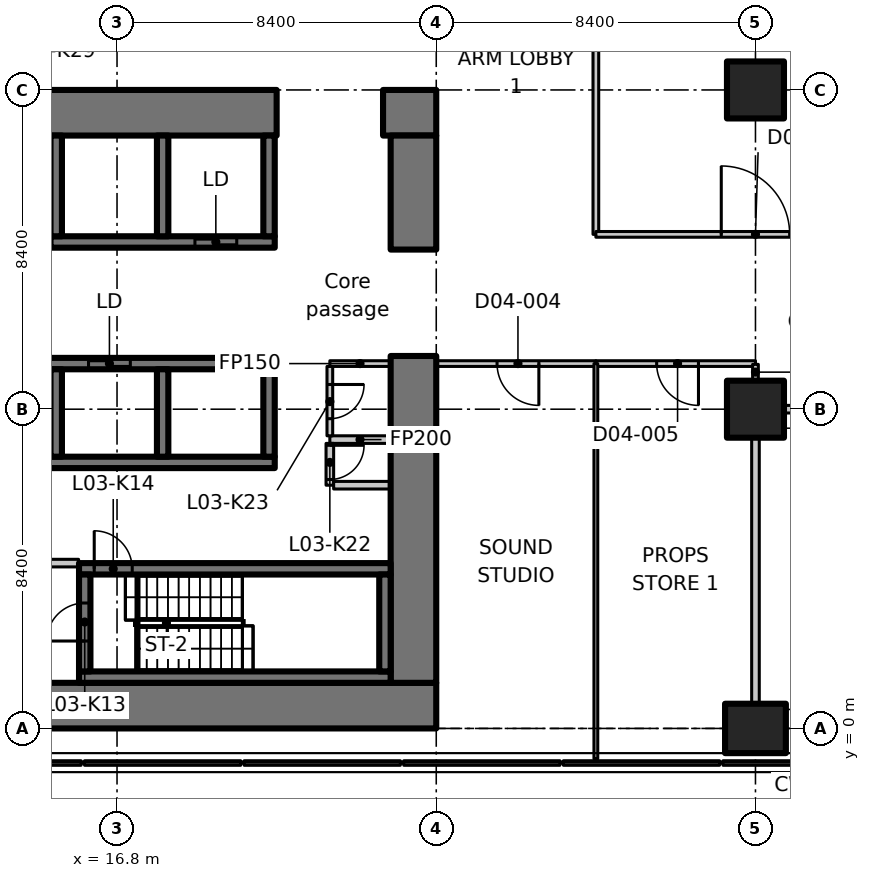
"""IFC4 building model, lengths in metres.
Left out: names, types, materials, properties, quantities, classifications, styles, units other than length and angle.
Written with IfcOpenShell. Run it as: python <this file> out.ifc"""

import sys

from ifc_helpers import new_model, si_unit, direction, frame, frame_2d, origin, origin_2d, place, context, subcontext, project, spatial, polyline, rectangle, outline, extrude, element, fill, save


model = new_model("IFC4")
c1 = context("Model", 3, precision=1e-05, world=origin(), true_north=direction((0.0, 1.0)))
c2 = subcontext(c1, "Body", "Model", "MODEL_VIEW")
j1 = project(units=[si_unit("LENGTHUNIT", "METRE"), si_unit("PLANEANGLEUNIT", "RADIAN")], contexts=[c1])
p1 = place(None, origin())
s1 = spatial("IfcSite", under=j1, at=p1, CompositionType="ELEMENT")
p2 = place(p1, origin())
s2 = spatial("IfcBuilding", under=s1, at=p2, CompositionType="ELEMENT")
p3 = place(p2, frame((0.0, 0.0, 20.0)))
s3 = spatial("IfcBuildingStorey", under=s2, at=p3, CompositionType="ELEMENT", Elevation=20.0)
p4 = place(p3, frame((33.6, 0.0, 0.0), z_axis=(0.0, 0.0, 1.0), x_axis=(0.0, 1.0, 0.0)))
e1 = element("IfcColumn", 1, at=p4, inside=s3, PredefinedType="COLUMN", context=c2, shape_type="SweptSolid", body=[
    extrude(rectangle(XDim=1.3, YDim=1.6, at=origin_2d()), origin(), (0.0, 0.0, 1.0), 7.25),
])
for number, where, z_axis, x_axis in (
    (2, (33.6, 8.4, 0.0), (0.0, 0.0, 1.0), (1.0, 0.0, 0.0)),
    (3, (33.6, 16.8, 0.0), (0.0, 0.0, 1.0), (1.0, 0.0, 0.0)),
):
    element("IfcColumn", number, at=place(p3, frame(where, z_axis=z_axis, x_axis=x_axis)), inside=s3, PredefinedType="COLUMN", context=c2, shape_type="SweptSolid", body=[
        extrude(rectangle(XDim=1.5, YDim=1.5, at=origin_2d()), origin(), (0.0, 0.0, 1.0), 7.25),
    ])
p5 = place(p3, origin())
e4 = element("IfcWall", 4, at=p5, inside=s3, PredefinedType="SOLIDWALL", context=c2, shape_type="SweptSolid", body=[
    extrude(outline(polyline([(15.855, -0.97), (15.855, -0.85), (11.745, -0.85), (11.745, -0.97), (15.855, -0.97)])), origin(), (0.0, 0.0, 1.0), 7.5),
])
p6 = place(p3, origin())
e5 = element("IfcWall", 5, at=p6, inside=s3, PredefinedType="SOLIDWALL", context=c2, shape_type="SweptSolid", body=[
    extrude(outline(polyline([(20.055, -0.97), (20.055, -0.85), (15.945, -0.85), (15.945, -0.97), (20.055, -0.97)])), origin(), (0.0, 0.0, 1.0), 7.5),
])
p7 = place(p3, origin())
e6 = element("IfcWall", 6, at=p7, inside=s3, PredefinedType="SOLIDWALL", context=c2, shape_type="SweptSolid", body=[
    extrude(outline(polyline([(24.255, -0.97), (24.255, -0.85), (20.145, -0.85), (20.145, -0.97), (24.255, -0.97)])), origin(), (0.0, 0.0, 1.0), 7.5),
])
p8 = place(p3, origin())
e7 = element("IfcWall", 7, at=p8, inside=s3, PredefinedType="SOLIDWALL", context=c2, shape_type="SweptSolid", body=[
    extrude(outline(polyline([(28.455, -0.97), (28.455, -0.85), (24.345, -0.85), (24.345, -0.97), (28.455, -0.97)])), origin(), (0.0, 0.0, 1.0), 7.5),
])
p9 = place(p3, origin())
e8 = element("IfcWall", 8, at=p9, inside=s3, PredefinedType="SOLIDWALL", context=c2, shape_type="SweptSolid", body=[
    extrude(outline(polyline([(32.655, -0.97), (32.655, -0.85), (28.545, -0.85), (28.545, -0.97), (32.655, -0.97)])), origin(), (0.0, 0.0, 1.0), 7.5),
])
p10 = place(p3, origin())
e9 = element("IfcWall", 9, at=p10, inside=s3, PredefinedType="SOLIDWALL", context=c2, shape_type="SweptSolid", body=[
    extrude(outline(polyline([(36.855, -0.97), (36.855, -0.85), (32.745, -0.85), (32.745, -0.97), (36.855, -0.97)])), origin(), (0.0, 0.0, 1.0), 7.5),
])
p11 = place(p3, frame((6.736, 0.6, 0.0), z_axis=(0.0, 0.0, 1.0), x_axis=(1.0, 0.0, 0.0)))
e10 = element("IfcWall", 10, at=p11, inside=s3, PredefinedType="SHEAR", context=c2, shape_type="SweptSolid", body=[
    extrude(rectangle(XDim=18.464, YDim=1.2, at=frame_2d((9.232, 0.0))), origin(), (0.0, 0.0, 1.0), 7.25),
])
p12 = place(p3, frame((-1.1, 16.2, 0.0), z_axis=(0.0, 0.0, 1.0), x_axis=(1.0, 0.0, 0.0)))
e11 = element("IfcWall", 11, at=p12, inside=s3, PredefinedType="SHEAR", context=c2, shape_type="SweptSolid", body=[
    extrude(rectangle(XDim=22.1, YDim=1.2, at=frame_2d((11.05, 0.0))), origin(), (0.0, 0.0, 1.0), 7.25),
])
p13 = place(p12, frame((3.15, 0.0, 0.0)))
e12 = element("IfcOpeningElement", 12, at=p13, cuts=e11, PredefinedType="OPENING", context=c2, shape_type="SweptSolid", body=[
    extrude(rectangle(XDim=1.1, YDim=2.3, at=frame_2d((0.55, 1.15))), frame((0.0, 0.61, 0.0), z_axis=(0.0, -1.0, 0.0), x_axis=(1.0, 0.0, 0.0)), (0.0, 0.0, 1.0), 1.22),
])
p14 = place(p3, frame((23.8, 16.2, 0.0), z_axis=(0.0, 0.0, 1.0), x_axis=(1.0, 0.0, 0.0)))
e13 = element("IfcWall", 13, at=p14, inside=s3, PredefinedType="SHEAR", context=c2, shape_type="SweptSolid", body=[
    extrude(rectangle(XDim=1.4, YDim=1.2, at=frame_2d((0.7, 0.0))), origin(), (0.0, 0.0, 1.0), 7.25),
])
p15 = place(p3, frame((24.6, 1.2, 0.0), z_axis=(0.0, 0.0, 1.0), x_axis=(0.0, 1.0, 0.0)))
e14 = element("IfcWall", 14, at=p15, inside=s3, PredefinedType="SHEAR", context=c2, shape_type="SweptSolid", body=[
    extrude(rectangle(XDim=8.6, YDim=1.2, at=frame_2d((4.3, 0.0))), origin(), (0.0, 0.0, 1.0), 7.25),
])
p16 = place(p3, frame((24.6, 12.6, 0.0), z_axis=(0.0, 0.0, 1.0), x_axis=(0.0, 1.0, 0.0)))
e15 = element("IfcWall", 15, at=p16, inside=s3, PredefinedType="SHEAR", context=c2, shape_type="SweptSolid", body=[
    extrude(rectangle(XDim=3.0, YDim=1.2, at=frame_2d((1.5, 0.0))), origin(), (0.0, 0.0, 1.0), 7.25),
])
p17 = place(p3, frame((1.2, 7.0, 0.0), z_axis=(0.0, 0.0, 1.0), x_axis=(1.0, 0.0, 0.0)))
e16 = element("IfcWall", 16, at=p17, inside=s3, PredefinedType="SHEAR", context=c2, shape_type="SweptSolid", body=[
    extrude(rectangle(XDim=19.75, YDim=0.3, at=frame_2d((9.875, 0.0))), origin(), (0.0, 0.0, 1.0), 7.25),
])
p18 = place(p3, frame((1.2, 9.6, 0.0), z_axis=(0.0, 0.0, 1.0), x_axis=(1.0, 0.0, 0.0)))
e17 = element("IfcWall", 17, at=p18, inside=s3, PredefinedType="SHEAR", context=c2, shape_type="SweptSolid", body=[
    extrude(rectangle(XDim=19.75, YDim=0.3, at=frame_2d((9.875, 0.0))), origin(), (0.0, 0.0, 1.0), 7.25),
])
p19 = place(p18, frame((0.85, 0.0, 0.0)))
e18 = element("IfcOpeningElement", 18, at=p19, cuts=e17, PredefinedType="OPENING", context=c2, shape_type="SweptSolid", body=[
    extrude(rectangle(XDim=1.1, YDim=2.3, at=frame_2d((0.55, 1.15))), frame((0.0, 0.16, 0.0), z_axis=(0.0, -1.0, 0.0), x_axis=(1.0, 0.0, 0.0)), (0.0, 0.0, 1.0), 0.32),
])
p20 = place(p18, frame((3.65, 0.0, 0.0)))
e19 = element("IfcOpeningElement", 19, at=p20, cuts=e17, PredefinedType="OPENING", context=c2, shape_type="SweptSolid", body=[
    extrude(rectangle(XDim=1.1, YDim=2.3, at=frame_2d((0.55, 1.15))), frame((0.0, 0.16, 0.0), z_axis=(0.0, -1.0, 0.0), x_axis=(1.0, 0.0, 0.0)), (0.0, 0.0, 1.0), 0.32),
])
p21 = place(p18, frame((6.45, 0.0, 0.0)))
e20 = element("IfcOpeningElement", 20, at=p21, cuts=e17, PredefinedType="OPENING", context=c2, shape_type="SweptSolid", body=[
    extrude(rectangle(XDim=1.1, YDim=2.3, at=frame_2d((0.55, 1.15))), frame((0.0, 0.16, 0.0), z_axis=(0.0, -1.0, 0.0), x_axis=(1.0, 0.0, 0.0)), (0.0, 0.0, 1.0), 0.32),
])
p22 = place(p18, frame((9.25, 0.0, 0.0)))
e21 = element("IfcOpeningElement", 21, at=p22, cuts=e17, PredefinedType="OPENING", context=c2, shape_type="SweptSolid", body=[
    extrude(rectangle(XDim=1.1, YDim=2.3, at=frame_2d((0.55, 1.15))), frame((0.0, 0.16, 0.0), z_axis=(0.0, -1.0, 0.0), x_axis=(1.0, 0.0, 0.0)), (0.0, 0.0, 1.0), 0.32),
])
p23 = place(p18, frame((12.05, 0.0, 0.0)))
e22 = element("IfcOpeningElement", 22, at=p23, cuts=e17, PredefinedType="OPENING", context=c2, shape_type="SweptSolid", body=[
    extrude(rectangle(XDim=1.1, YDim=2.3, at=frame_2d((0.55, 1.15))), frame((0.0, 0.16, 0.0), z_axis=(0.0, -1.0, 0.0), x_axis=(1.0, 0.0, 0.0)), (0.0, 0.0, 1.0), 0.32),
])
p24 = place(p18, frame((14.85, 0.0, 0.0)))
e23 = element("IfcOpeningElement", 23, at=p24, cuts=e17, PredefinedType="OPENING", context=c2, shape_type="SweptSolid", body=[
    extrude(rectangle(XDim=1.1, YDim=2.3, at=frame_2d((0.55, 1.15))), frame((0.0, 0.16, 0.0), z_axis=(0.0, -1.0, 0.0), x_axis=(1.0, 0.0, 0.0)), (0.0, 0.0, 1.0), 0.32),
])
for number, where, z_axis, x_axis in (
    (24, (15.2, 7.15, 0.0), (0.0, 0.0, 1.0), (0.0, 1.0, 0.0)),
    (25, (18.0, 7.15, 0.0), (0.0, 0.0, 1.0), (0.0, 1.0, 0.0)),
    (26, (20.8, 7.15, 0.0), (0.0, 0.0, 1.0), (0.0, 1.0, 0.0)),
):
    element("IfcWall", number, at=place(p3, frame(where, z_axis=z_axis, x_axis=x_axis)), inside=s3, PredefinedType="SHEAR", context=c2, shape_type="SweptSolid", body=[
        extrude(rectangle(XDim=2.3, YDim=0.3, at=frame_2d((1.15, 0.0))), origin(), (0.0, 0.0, 1.0), 7.25),
    ])
p25 = place(p3, frame((15.05, 12.8, 0.0), z_axis=(0.0, 0.0, 1.0), x_axis=(1.0, 0.0, 0.0)))
e27 = element("IfcWall", 27, at=p25, inside=s3, PredefinedType="SHEAR", context=c2, shape_type="SweptSolid", body=[
    extrude(rectangle(XDim=5.9, YDim=0.3, at=frame_2d((2.95, 0.0))), origin(), (0.0, 0.0, 1.0), 7.25),
])
p26 = place(p25, frame((3.8, 0.0, 0.0)))
e28 = element("IfcOpeningElement", 28, at=p26, cuts=e27, PredefinedType="OPENING", context=c2, shape_type="SweptSolid", body=[
    extrude(rectangle(XDim=1.1, YDim=2.3, at=frame_2d((0.55, 1.15))), frame((0.0, 0.16, 0.0), z_axis=(0.0, -1.0, 0.0), x_axis=(1.0, 0.0, 0.0)), (0.0, 0.0, 1.0), 0.32),
])
for number, where, z_axis, x_axis in (
    (29, (15.2, 12.95, 0.0), (0.0, 0.0, 1.0), (0.0, 1.0, 0.0)),
    (30, (18.0, 12.95, 0.0), (0.0, 0.0, 1.0), (0.0, 1.0, 0.0)),
    (31, (20.8, 12.95, 0.0), (0.0, 0.0, 1.0), (0.0, 1.0, 0.0)),
):
    element("IfcWall", number, at=place(p3, frame(where, z_axis=z_axis, x_axis=x_axis)), inside=s3, PredefinedType="SHEAR", context=c2, shape_type="SweptSolid", body=[
        extrude(rectangle(XDim=2.65, YDim=0.3, at=frame_2d((1.325, 0.0))), origin(), (0.0, 0.0, 1.0), 7.25),
    ])
p27 = place(p3, frame((15.8, 1.35, 0.0), z_axis=(0.0, 0.0, 1.0), x_axis=(1.0, 0.0, 0.0)))
e32 = element("IfcWall", 32, at=p27, inside=s3, PredefinedType="SHEAR", context=c2, shape_type="SweptSolid", body=[
    extrude(rectangle(XDim=8.2, YDim=0.3, at=frame_2d((4.1, 0.0))), origin(), (0.0, 0.0, 1.0), 7.25),
])
p28 = place(p3, frame((15.8, 4.2, 0.0), z_axis=(0.0, 0.0, 1.0), x_axis=(1.0, 0.0, 0.0)))
e33 = element("IfcWall", 33, at=p28, inside=s3, PredefinedType="SHEAR", context=c2, shape_type="SweptSolid", body=[
    extrude(rectangle(XDim=8.2, YDim=0.3, at=frame_2d((4.1, 0.0))), origin(), (0.0, 0.0, 1.0), 7.25),
])
p29 = place(p28, frame((0.4, 0.0, 0.0)))
e34 = element("IfcOpeningElement", 34, at=p29, cuts=e33, PredefinedType="OPENING", context=c2, shape_type="SweptSolid", body=[
    extrude(rectangle(XDim=1.0, YDim=2.1, at=frame_2d((0.5, 1.05))), frame((0.0, 0.16, 0.0), z_axis=(0.0, -1.0, 0.0), x_axis=(1.0, 0.0, 0.0)), (0.0, 0.0, 1.0), 0.32),
])
p30 = place(p3, frame((15.95, 1.5, 0.0), z_axis=(0.0, 0.0, 1.0), x_axis=(0.0, 1.0, 0.0)))
e35 = element("IfcWall", 35, at=p30, inside=s3, PredefinedType="SHEAR", context=c2, shape_type="SweptSolid", body=[
    extrude(rectangle(XDim=2.55, YDim=0.3, at=frame_2d((1.275, 0.0))), origin(), (0.0, 0.0, 1.0), 7.25),
])
p31 = place(p30, frame((0.8, 0.0, 0.0)))
e36 = element("IfcOpeningElement", 36, at=p31, cuts=e35, PredefinedType="OPENING", context=c2, shape_type="SweptSolid", body=[
    extrude(rectangle(XDim=1.0, YDim=2.1, at=frame_2d((0.5, 1.05))), frame((0.0, 0.16, 0.0), z_axis=(0.0, -1.0, 0.0), x_axis=(1.0, 0.0, 0.0)), (0.0, 0.0, 1.0), 0.32),
])
p32 = place(p3, frame((23.85, 1.5, 0.0), z_axis=(0.0, 0.0, 1.0), x_axis=(0.0, 1.0, 0.0)))
e37 = element("IfcWall", 37, at=p32, inside=s3, PredefinedType="SHEAR", context=c2, shape_type="SweptSolid", body=[
    extrude(rectangle(XDim=2.55, YDim=0.3, at=frame_2d((1.275, 0.0))), origin(), (0.0, 0.0, 1.0), 7.25),
])
p33 = place(p3, frame((13.362, 4.35, 0.0), z_axis=(0.0, 0.0, 1.0), x_axis=(1.0, 0.0, 0.0)))
e38 = element("IfcWall", 38, at=p33, inside=s3, PredefinedType="PARTITIONING", context=c2, shape_type="SweptSolid", body=[
    extrude(rectangle(XDim=2.426, YDim=0.2, at=frame_2d((1.213, 0.0))), origin(), (0.0, 0.0, 1.0), 7.25),
])
p34 = place(p33, frame((0.638, 0.0, 0.0)))
e39 = element("IfcOpeningElement", 39, at=p34, cuts=e38, PredefinedType="OPENING", context=c2, shape_type="SweptSolid", body=[
    extrude(rectangle(XDim=1.0, YDim=2.1, at=frame_2d((0.5, 1.05))), frame((0.0, 0.11, 0.0), z_axis=(0.0, -1.0, 0.0), x_axis=(1.0, 0.0, 0.0)), (0.0, 0.0, 1.0), 0.22),
])
p35 = place(p3, frame((23.988, 7.6, 0.0), z_axis=(0.0, 0.0, 1.0), x_axis=(-1.0, 0.0, 0.0)))
e40 = element("IfcWall", 40, at=p35, inside=s3, PredefinedType="PARTITIONING", context=c2, shape_type="SweptSolid", body=[
    extrude(rectangle(XDim=1.588, YDim=0.2, at=frame_2d((0.794, 0.0))), origin(), (0.0, 0.0, 1.0), 7.25),
])
p36 = place(p3, frame((22.4, 7.5, 0.0), z_axis=(0.0, 0.0, 1.0), x_axis=(0.0, -1.0, 0.0)))
e41 = element("IfcWall", 41, at=p36, inside=s3, PredefinedType="PARTITIONING", context=c2, shape_type="SweptSolid", body=[
    extrude(rectangle(XDim=1.1, YDim=0.2, at=frame_2d((0.55, 0.0))), origin(), (0.0, 0.0, 1.0), 7.25),
])
p37 = place(p36, frame((0.05, 0.0, 0.0)))
e42 = element("IfcOpeningElement", 42, at=p37, cuts=e41, PredefinedType="OPENING", context=c2, shape_type="SweptSolid", body=[
    extrude(rectangle(XDim=0.9, YDim=2.1, at=frame_2d((0.45, 1.05))), frame((0.0, 0.11, 0.0), z_axis=(0.0, -1.0, 0.0), x_axis=(1.0, 0.0, 0.0)), (0.0, 0.0, 1.0), 0.22),
])
p38 = place(p3, frame((22.5, 6.4, 0.0), z_axis=(0.0, 0.0, 1.0), x_axis=(1.0, 0.0, 0.0)))
e43 = element("IfcWall", 43, at=p38, inside=s3, PredefinedType="PARTITIONING", context=c2, shape_type="SweptSolid", body=[
    extrude(rectangle(XDim=1.488, YDim=0.2, at=frame_2d((0.744, 0.0))), origin(), (0.0, 0.0, 1.0), 7.25),
])
p39 = place(p3, frame((23.988, 9.6, 0.0), z_axis=(0.0, 0.0, 1.0), x_axis=(-1.0, 0.0, 0.0)))
e44 = element("IfcWall", 44, at=p39, inside=s3, PredefinedType="PARTITIONING", context=c2, shape_type="SweptSolid", body=[
    extrude(rectangle(XDim=1.588, YDim=0.15, at=frame_2d((0.794, 0.0))), origin(), (0.0, 0.0, 1.0), 7.25),
])
p40 = place(p3, frame((22.4, 9.525, 0.0), z_axis=(0.0, 0.0, 1.0), x_axis=(0.0, -1.0, 0.0)))
e45 = element("IfcWall", 45, at=p40, inside=s3, PredefinedType="PARTITIONING", context=c2, shape_type="SweptSolid", body=[
    extrude(rectangle(XDim=1.825, YDim=0.15, at=frame_2d((0.913, 0.0))), origin(), (0.0, 0.0, 1.0), 7.25),
])
p41 = place(p40, frame((0.475, 0.0, 0.0)))
e46 = element("IfcOpeningElement", 46, at=p41, cuts=e45, PredefinedType="OPENING", context=c2, shape_type="SweptSolid", body=[
    extrude(rectangle(XDim=0.9, YDim=2.1, at=frame_2d((0.45, 1.05))), frame((0.0, 0.085, 0.0), z_axis=(0.0, -1.0, 0.0), x_axis=(1.0, 0.0, 0.0)), (0.0, 0.0, 1.0), 0.17),
])
p42 = place(p3, frame((29.4, 9.6, 0.0), z_axis=(0.0, 0.0, 1.0), x_axis=(-1.0, 0.0, 0.0)))
e47 = element("IfcWall", 47, at=p42, inside=s3, PredefinedType="PARTITIONING", context=c2, shape_type="SweptSolid", body=[
    extrude(rectangle(XDim=4.2, YDim=0.15, at=frame_2d((2.1, 0.0))), origin(), (0.0, 0.0, 1.0), 7.23),
])
p43 = place(p42, frame((1.5, 0.0, 0.0)))
e48 = element("IfcOpeningElement", 48, at=p43, cuts=e47, PredefinedType="OPENING", context=c2, shape_type="SweptSolid", body=[
    extrude(rectangle(XDim=1.1, YDim=2.1, at=frame_2d((0.55, 1.05))), frame((0.0, 0.085, 0.0), z_axis=(0.0, -1.0, 0.0), x_axis=(1.0, 0.0, 0.0)), (0.0, 0.0, 1.0), 0.17),
])
p44 = place(p3, frame((29.4, 21.2, 0.0), z_axis=(0.0, 0.0, 1.0), x_axis=(0.0, -1.0, 0.0)))
e49 = element("IfcWall", 49, at=p44, inside=s3, PredefinedType="PARTITIONING", context=c2, shape_type="SweptSolid", body=[
    extrude(rectangle(XDim=8.2, YDim=0.15, at=frame_2d((4.1, 0.0))), origin(), (0.0, 0.0, 1.0), 7.23),
])
p45 = place(p3, frame((41.23, 8.4, 0.0), z_axis=(0.0, 0.0, 1.0), x_axis=(-1.0, 0.0, 0.0)))
e50 = element("IfcWall", 50, at=p45, inside=s3, PredefinedType="PARTITIONING", context=c2, shape_type="SweptSolid", body=[
    extrude(rectangle(XDim=6.86, YDim=0.2, at=frame_2d((3.43, 0.0))), origin(), (0.0, 0.0, 1.0), 7.23),
])
p46 = place(p3, frame((33.6, 9.6, 0.0), z_axis=(0.0, 0.0, 1.0), x_axis=(-1.0, 0.0, 0.0)))
e51 = element("IfcWall", 51, at=p46, inside=s3, PredefinedType="PARTITIONING", context=c2, shape_type="SweptSolid", body=[
    extrude(rectangle(XDim=4.2, YDim=0.15, at=frame_2d((2.1, 0.0))), origin(), (0.0, 0.0, 1.0), 7.23),
])
p47 = place(p46, frame((1.5, 0.0, 0.0)))
e52 = element("IfcOpeningElement", 52, at=p47, cuts=e51, PredefinedType="OPENING", context=c2, shape_type="SweptSolid", body=[
    extrude(rectangle(XDim=1.1, YDim=2.1, at=frame_2d((0.55, 1.05))), frame((0.0, 0.085, 0.0), z_axis=(0.0, -1.0, 0.0), x_axis=(1.0, 0.0, 0.0)), (0.0, 0.0, 1.0), 0.17),
])
p48 = place(p3, frame((33.6, 9.17, 0.0), z_axis=(0.0, 0.0, 1.0), x_axis=(0.0, 1.0, 0.0)))
e53 = element("IfcWall", 53, at=p48, inside=s3, PredefinedType="PARTITIONING", context=c2, shape_type="SweptSolid", body=[
    extrude(rectangle(XDim=0.41, YDim=0.15, at=frame_2d((0.205, 0.0))), origin(), (0.0, 0.0, 1.0), 7.23),
])
p49 = place(p3, frame((29.4, 13.0, 0.0), z_axis=(0.0, 0.0, 1.0), x_axis=(1.0, 0.0, 0.0)))
e54 = element("IfcWall", 54, at=p49, inside=s3, PredefinedType="PARTITIONING", context=c2, shape_type="SweptSolid", body=[
    extrude(rectangle(XDim=8.4, YDim=0.15, at=frame_2d((4.2, 0.0))), origin(), (0.0, 0.0, 1.0), 7.23),
])
p50 = place(p49, frame((3.3, 0.0, 0.0)))
e55 = element("IfcOpeningElement", 55, at=p50, cuts=e54, PredefinedType="OPENING", context=c2, shape_type="SweptSolid", body=[
    extrude(rectangle(XDim=1.8, YDim=2.1, at=frame_2d((0.9, 1.05))), frame((0.0, 0.085, 0.0), z_axis=(0.0, -1.0, 0.0), x_axis=(1.0, 0.0, 0.0)), (0.0, 0.0, 1.0), 0.17),
])
p51 = place(p3, frame((33.6, 0.67, 0.0), z_axis=(0.0, 0.0, 1.0), x_axis=(0.0, 1.0, 0.0)))
e56 = element("IfcWall", 56, at=p51, inside=s3, PredefinedType="PARTITIONING", context=c2, shape_type="SweptSolid", body=[
    extrude(rectangle(XDim=6.96, YDim=0.2, at=frame_2d((3.48, 0.0))), origin(), (0.0, 0.0, 1.0), 7.23),
])
p52 = place(p3, frame((29.4, 9.6, 0.0), z_axis=(0.0, 0.0, 1.0), x_axis=(0.0, -1.0, 0.0)))
e57 = element("IfcWall", 57, at=p52, inside=s3, PredefinedType="PARTITIONING", context=c2, shape_type="SweptSolid", body=[
    extrude(outline(polyline([(0.0, 0.0), (10.398, 0.0), (10.398, 7.23), (10.05, 7.23), (10.048, 6.88), (9.152, 6.88), (9.15, 7.23), (0.0, 7.23), (0.0, 0.0)])), frame((0.0, 0.05, 0.0), z_axis=(0.0, -1.0, 0.0), x_axis=(1.0, 0.0, 0.0)), (0.0, 0.0, 1.0), 0.1),
])
p53 = place(p24, origin())
e58 = element("IfcDoor", 58, at=p53, inside=s3, OperationType="SLIDING_TO_LEFT", PredefinedType="DOOR", context=c2, shape_type="SweptSolid", body=[
    extrude(rectangle(XDim=1.1, YDim=2.3, at=frame_2d((0.55, 1.15))), frame((0.0, 0.025, 0.0), z_axis=(0.0, -1.0, 0.0), x_axis=(1.0, 0.0, 0.0)), (0.0, 0.0, 1.0), 0.05),
])
fill(e23, e58)
p54 = place(p26, origin())
e59 = element("IfcDoor", 59, at=p54, inside=s3, OperationType="SLIDING_TO_LEFT", PredefinedType="DOOR", context=c2, shape_type="SweptSolid", body=[
    extrude(rectangle(XDim=1.1, YDim=2.3, at=frame_2d((0.55, 1.15))), frame((0.0, 0.025, 0.0), z_axis=(0.0, -1.0, 0.0), x_axis=(1.0, 0.0, 0.0)), (0.0, 0.0, 1.0), 0.05),
])
fill(e28, e59)
p55 = place(p31, origin())
e60 = element("IfcDoor", 60, at=p55, inside=s3, OperationType="SINGLE_SWING_RIGHT", PredefinedType="DOOR", context=c2, shape_type="SweptSolid", body=[
    extrude(rectangle(XDim=1.0, YDim=2.1, at=frame_2d((0.5, 1.05))), frame((0.0, 0.025, 0.0), z_axis=(0.0, -1.0, 0.0), x_axis=(1.0, 0.0, 0.0)), (0.0, 0.0, 1.0), 0.05),
])
fill(e36, e60)
p56 = place(p29, origin())
e61 = element("IfcDoor", 61, at=p56, inside=s3, OperationType="SINGLE_SWING_LEFT", PredefinedType="DOOR", context=c2, shape_type="SweptSolid", body=[
    extrude(rectangle(XDim=1.0, YDim=2.1, at=frame_2d((0.5, 1.05))), frame((0.0, 0.025, 0.0), z_axis=(0.0, -1.0, 0.0), x_axis=(1.0, 0.0, 0.0)), (0.0, 0.0, 1.0), 0.05),
])
fill(e34, e61)
p57 = place(p37, origin())
e62 = element("IfcDoor", 62, at=p57, inside=s3, OperationType="SINGLE_SWING_LEFT", PredefinedType="DOOR", context=c2, shape_type="SweptSolid", body=[
    extrude(rectangle(XDim=0.9, YDim=2.1, at=frame_2d((0.45, 1.05))), frame((0.0, 0.025, 0.0), z_axis=(0.0, -1.0, 0.0), x_axis=(1.0, 0.0, 0.0)), (0.0, 0.0, 1.0), 0.05),
])
fill(e42, e62)
p58 = place(p41, origin())
e63 = element("IfcDoor", 63, at=p58, inside=s3, OperationType="SINGLE_SWING_RIGHT", PredefinedType="DOOR", context=c2, shape_type="SweptSolid", body=[
    extrude(rectangle(XDim=0.9, YDim=2.1, at=frame_2d((0.45, 1.05))), frame((0.0, 0.025, 0.0), z_axis=(0.0, -1.0, 0.0), x_axis=(1.0, 0.0, 0.0)), (0.0, 0.0, 1.0), 0.05),
])
fill(e46, e63)
p59 = place(p43, origin())
e64 = element("IfcDoor", 64, at=p59, inside=s3, OperationType="SINGLE_SWING_LEFT", PredefinedType="DOOR", context=c2, shape_type="SweptSolid", body=[
    extrude(rectangle(XDim=1.1, YDim=2.1, at=frame_2d((0.55, 1.05))), frame((0.0, 0.025, 0.0), z_axis=(0.0, -1.0, 0.0), x_axis=(1.0, 0.0, 0.0)), (0.0, 0.0, 1.0), 0.05),
])
fill(e48, e64)
p60 = place(p47, origin())
e65 = element("IfcDoor", 65, at=p60, inside=s3, OperationType="SINGLE_SWING_LEFT", PredefinedType="DOOR", context=c2, shape_type="SweptSolid", body=[
    extrude(rectangle(XDim=1.1, YDim=2.1, at=frame_2d((0.55, 1.05))), frame((0.0, 0.025, 0.0), z_axis=(0.0, -1.0, 0.0), x_axis=(1.0, 0.0, 0.0)), (0.0, 0.0, 1.0), 0.05),
])
fill(e52, e65)
p61 = place(p50, origin())
e66 = element("IfcDoor", 66, at=p61, inside=s3, OperationType="DOUBLE_DOOR_SINGLE_SWING", PredefinedType="DOOR", context=c2, shape_type="SweptSolid", body=[
    extrude(rectangle(XDim=1.8, YDim=2.1, at=frame_2d((0.9, 1.05))), frame((0.0, 0.025, 0.0), z_axis=(0.0, -1.0, 0.0), x_axis=(1.0, 0.0, 0.0)), (0.0, 0.0, 1.0), 0.05),
])
fill(e55, e66)
save(model, sys.argv[1])
